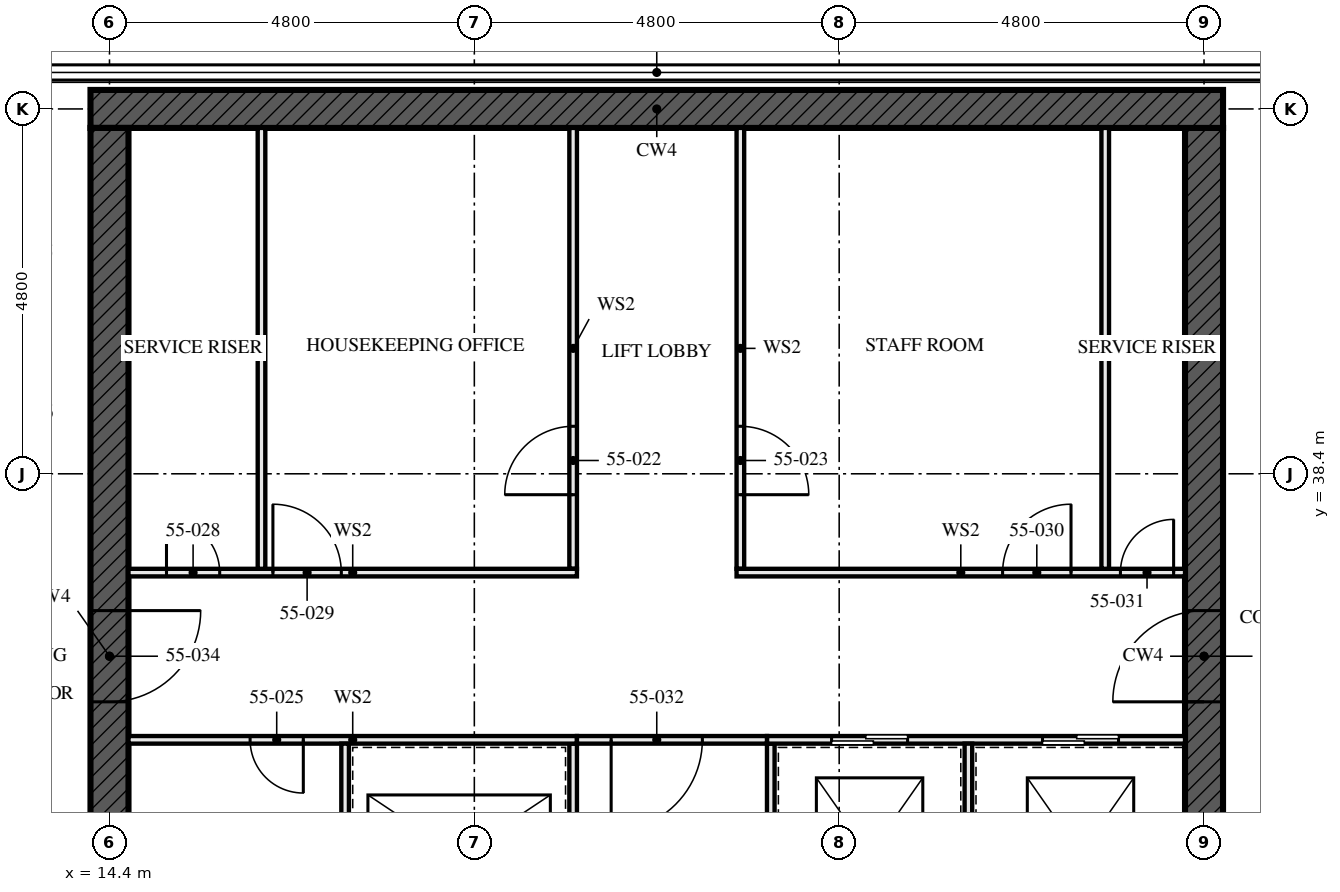
"""IFC4 building model, lengths in metres.
Left out: names, types, materials, properties, quantities, classifications, styles, units other than length and angle.
Written with IfcOpenShell. Run it as: python <this file> out.ifc"""

import sys

from ifc_helpers import new_model, si_unit, direction, frame, frame_2d, origin, place, context, subcontext, project, spatial, rectangle, extrude, element, fill, save


model = new_model("IFC4")
c1 = context("Model", 3, precision=1e-05, world=origin(), true_north=direction((0.0, 1.0)))
c2 = subcontext(c1, "Body", "Model", "MODEL_VIEW")
j1 = project(units=[si_unit("LENGTHUNIT", "METRE"), si_unit("PLANEANGLEUNIT", "RADIAN")], contexts=[c1])
p1 = place(None, origin())
s1 = spatial("IfcSite", under=j1, at=p1, CompositionType="ELEMENT")
p2 = place(p1, origin())
s2 = spatial("IfcBuilding", under=s1, at=p2, CompositionType="ELEMENT")
p3 = place(p2, frame((0.0, 0.0, 201.5)))
s3 = spatial("IfcBuildingStorey", under=s2, at=p3, CompositionType="ELEMENT", Elevation=201.5)
p4 = place(p3, frame((29.05, 43.2, -0.17), z_axis=(0.0, 0.0, 1.0), x_axis=(-1.0, 0.0, 0.0)))
e1 = element("IfcWall", 1, at=p4, inside=s3, PredefinedType="SHEAR", context=c2, shape_type="SweptSolid", body=[
    extrude(rectangle(XDim=14.9, YDim=0.5, at=frame_2d((7.45, 0.0))), origin(), (0.0, 0.0, 1.0), 3.5),
])
p5 = place(p3, frame((14.4, 42.95, -0.17), z_axis=(0.0, 0.0, 1.0), x_axis=(0.0, -1.0, 0.0)))
e2 = element("IfcWall", 2, at=p5, inside=s3, PredefinedType="SHEAR", context=c2, shape_type="SweptSolid", body=[
    extrude(rectangle(XDim=13.9, YDim=0.5, at=frame_2d((6.95, 0.0))), origin(), (0.0, 0.0, 1.0), 3.5),
])
p6 = place(p5, frame((6.35, 0.0, 0.17)))
e3 = element("IfcOpeningElement", 3, at=p6, cuts=e2, PredefinedType="OPENING", context=c2, shape_type="SweptSolid", body=[
    extrude(rectangle(XDim=1.2, YDim=2.1, at=frame_2d((0.6, 1.05))), frame((0.0, 0.26, 0.0), z_axis=(0.0, -1.0, 0.0), x_axis=(1.0, 0.0, 0.0)), (0.0, 0.0, 1.0), 0.521),
])
p7 = place(p3, frame((28.8, 29.05, -0.17), z_axis=(0.0, 0.0, 1.0), x_axis=(0.0, 1.0, 0.0)))
e4 = element("IfcWall", 4, at=p7, inside=s3, PredefinedType="SHEAR", context=c2, shape_type="SweptSolid", body=[
    extrude(rectangle(XDim=13.9, YDim=0.5, at=frame_2d((6.95, 0.0))), origin(), (0.0, 0.0, 1.0), 3.5),
])
p8 = place(p7, frame((6.35, 0.0, 0.17)))
e5 = element("IfcOpeningElement", 5, at=p8, cuts=e4, PredefinedType="OPENING", context=c2, shape_type="SweptSolid", body=[
    extrude(rectangle(XDim=1.2, YDim=2.1, at=frame_2d((0.6, 1.05))), frame((0.0, 0.26, 0.0), z_axis=(0.0, -1.0, 0.0), x_axis=(1.0, 0.0, 0.0)), (0.0, 0.0, 1.0), 0.521),
])
for number, where, z_axis, x_axis in (
    (6, (16.4, 37.15, 0.0), (0.0, 0.0, 1.0), (0.0, 1.0, 0.0)),
    (7, (27.5, 37.15, 0.0), (0.0, 0.0, 1.0), (0.0, 1.0, 0.0)),
):
    element("IfcWall", number, at=place(p3, frame(where, z_axis=z_axis, x_axis=x_axis)), inside=s3, PredefinedType="SOLIDWALL", context=c2, shape_type="SweptSolid", body=[
        extrude(rectangle(XDim=5.8, YDim=0.1, at=frame_2d((2.9, 0.0))), origin(), (0.0, 0.0, 1.0), 3.33),
    ])
p9 = place(p3, frame((20.5, 29.05, 0.0), z_axis=(0.0, 0.0, 1.0), x_axis=(0.0, 1.0, 0.0)))
e8 = element("IfcWall", 8, at=p9, inside=s3, PredefinedType="SOLIDWALL", context=c2, shape_type="SweptSolid", body=[
    extrude(rectangle(XDim=5.8, YDim=0.1, at=frame_2d((2.9, 0.0))), origin(), (0.0, 0.0, 1.0), 3.33),
])
p10 = place(p9, frame((0.8, 0.0, 0.0)))
e9 = element("IfcOpeningElement", 9, at=p10, cuts=e8, PredefinedType="OPENING", context=c2, shape_type="SweptSolid", body=[
    extrude(rectangle(XDim=1.1, YDim=2.3, at=frame_2d((0.55, 1.15))), frame((0.0, 0.061, 0.0), z_axis=(0.0, -1.0, 0.0), x_axis=(1.0, 0.0, 0.0)), (0.0, 0.0, 1.0), 0.121),
])
p11 = place(p9, frame((3.775, 0.0, 0.0)))
e10 = element("IfcOpeningElement", 10, at=p11, cuts=e8, PredefinedType="OPENING", context=c2, shape_type="SweptSolid", body=[
    extrude(rectangle(XDim=1.1, YDim=2.3, at=frame_2d((0.55, 1.15))), frame((0.0, 0.061, 0.0), z_axis=(0.0, -1.0, 0.0), x_axis=(1.0, 0.0, 0.0)), (0.0, 0.0, 1.0), 0.121),
])
p12 = place(p3, frame((20.5, 37.15, 0.0), z_axis=(0.0, 0.0, 1.0), x_axis=(0.0, 1.0, 0.0)))
e11 = element("IfcWall", 11, at=p12, inside=s3, PredefinedType="SOLIDWALL", context=c2, shape_type="SweptSolid", body=[
    extrude(rectangle(XDim=5.8, YDim=0.1, at=frame_2d((2.9, 0.0))), origin(), (0.0, 0.0, 1.0), 3.33),
])
p13 = place(p12, frame((0.975, 0.0, 0.0)))
e12 = element("IfcOpeningElement", 12, at=p13, cuts=e11, PredefinedType="OPENING", context=c2, shape_type="SweptSolid", body=[
    extrude(rectangle(XDim=0.9, YDim=2.1, at=frame_2d((0.45, 1.05))), frame((0.0, 0.061, 0.0), z_axis=(0.0, -1.0, 0.0), x_axis=(1.0, 0.0, 0.0)), (0.0, 0.0, 1.0), 0.121),
])
p14 = place(p3, frame((22.7, 37.15, 0.0), z_axis=(0.0, 0.0, 1.0), x_axis=(0.0, 1.0, 0.0)))
e13 = element("IfcWall", 13, at=p14, inside=s3, PredefinedType="SOLIDWALL", context=c2, shape_type="SweptSolid", body=[
    extrude(rectangle(XDim=5.8, YDim=0.1, at=frame_2d((2.9, 0.0))), origin(), (0.0, 0.0, 1.0), 3.33),
])
p15 = place(p14, frame((0.975, 0.0, 0.0)))
e14 = element("IfcOpeningElement", 14, at=p15, cuts=e13, PredefinedType="OPENING", context=c2, shape_type="SweptSolid", body=[
    extrude(rectangle(XDim=0.9, YDim=2.1, at=frame_2d((0.45, 1.05))), frame((0.0, 0.061, 0.0), z_axis=(0.0, -1.0, 0.0), x_axis=(1.0, 0.0, 0.0)), (0.0, 0.0, 1.0), 0.121),
])
p16 = place(p3, frame((23.1, 29.05, 0.0), z_axis=(0.0, 0.0, 1.0), x_axis=(0.0, 1.0, 0.0)))
e15 = element("IfcWall", 15, at=p16, inside=s3, PredefinedType="SOLIDWALL", context=c2, shape_type="SweptSolid", body=[
    extrude(rectangle(XDim=5.8, YDim=0.1, at=frame_2d((2.9, 0.0))), origin(), (0.0, 0.0, 1.0), 3.33),
])
p17 = place(p16, frame((1.0, 0.0, 0.0)))
e16 = element("IfcOpeningElement", 16, at=p17, cuts=e15, PredefinedType="OPENING", context=c2, shape_type="SweptSolid", body=[
    extrude(rectangle(XDim=0.7, YDim=2.1, at=frame_2d((0.35, 1.05))), frame((0.0, 0.061, 0.0), z_axis=(0.0, -1.0, 0.0), x_axis=(1.0, 0.0, 0.0)), (0.0, 0.0, 1.0), 0.121),
])
p18 = place(p3, frame((14.65, 34.9, 0.0), z_axis=(0.0, 0.0, 1.0), x_axis=(1.0, 0.0, 0.0)))
e17 = element("IfcWall", 17, at=p18, inside=s3, PredefinedType="SOLIDWALL", context=c2, shape_type="SweptSolid", body=[
    extrude(rectangle(XDim=5.9, YDim=0.1, at=frame_2d((2.95, 0.0))), origin(), (0.0, 0.0, 1.0), 3.33),
])
p19 = place(p18, frame((1.6, 0.0, 0.0)))
e18 = element("IfcOpeningElement", 18, at=p19, cuts=e17, PredefinedType="OPENING", context=c2, shape_type="SweptSolid", body=[
    extrude(rectangle(XDim=0.7, YDim=2.1, at=frame_2d((0.35, 1.05))), frame((0.0, 0.061, 0.0), z_axis=(0.0, -1.0, 0.0), x_axis=(1.0, 0.0, 0.0)), (0.0, 0.0, 1.0), 0.121),
])
p20 = place(p3, frame((23.05, 34.9, 0.0), z_axis=(0.0, 0.0, 1.0), x_axis=(1.0, 0.0, 0.0)))
e19 = element("IfcWall", 19, at=p20, inside=s3, PredefinedType="SOLIDWALL", context=c2, shape_type="SweptSolid", body=[
    extrude(rectangle(XDim=5.5, YDim=0.1, at=frame_2d((2.75, 0.0))), origin(), (0.0, 0.0, 1.0), 3.33),
])
p21 = place(p20, frame((0.85, 0.0, 0.0)))
e20 = element("IfcOpeningElement", 20, at=p21, cuts=e19, PredefinedType="OPENING", context=c2, shape_type="SweptSolid", body=[
    extrude(rectangle(XDim=1.0, YDim=2.1, at=frame_2d((0.5, 1.05))), frame((0.0, 0.061, 0.0), z_axis=(0.0, -1.0, 0.0), x_axis=(1.0, 0.0, 0.0)), (0.0, 0.0, 1.0), 0.121),
])
p22 = place(p20, frame((3.625, 0.0, 0.0)))
e21 = element("IfcOpeningElement", 21, at=p22, cuts=e19, PredefinedType="OPENING", context=c2, shape_type="SweptSolid", body=[
    extrude(rectangle(XDim=1.0, YDim=2.1, at=frame_2d((0.5, 1.05))), frame((0.0, 0.061, 0.0), z_axis=(0.0, -1.0, 0.0), x_axis=(1.0, 0.0, 0.0)), (0.0, 0.0, 1.0), 0.121),
])
p23 = place(p3, frame((14.65, 37.1, 0.0), z_axis=(0.0, 0.0, 1.0), x_axis=(1.0, 0.0, 0.0)))
e22 = element("IfcWall", 22, at=p23, inside=s3, PredefinedType="SOLIDWALL", context=c2, shape_type="SweptSolid", body=[
    extrude(rectangle(XDim=5.9, YDim=0.1, at=frame_2d((2.95, 0.0))), origin(), (0.0, 0.0, 1.0), 3.33),
])
p24 = place(p23, frame((0.5, 0.0, 0.0)))
e23 = element("IfcOpeningElement", 23, at=p24, cuts=e22, PredefinedType="OPENING", context=c2, shape_type="SweptSolid", body=[
    extrude(rectangle(XDim=0.7, YDim=2.1, at=frame_2d((0.35, 1.05))), frame((0.0, 0.061, 0.0), z_axis=(0.0, -1.0, 0.0), x_axis=(1.0, 0.0, 0.0)), (0.0, 0.0, 1.0), 0.121),
])
p25 = place(p23, frame((1.9, 0.0, 0.0)))
e24 = element("IfcOpeningElement", 24, at=p25, cuts=e22, PredefinedType="OPENING", context=c2, shape_type="SweptSolid", body=[
    extrude(rectangle(XDim=0.9, YDim=2.1, at=frame_2d((0.45, 1.05))), frame((0.0, 0.061, 0.0), z_axis=(0.0, -1.0, 0.0), x_axis=(1.0, 0.0, 0.0)), (0.0, 0.0, 1.0), 0.121),
])
p26 = place(p3, frame((22.65, 37.1, 0.0), z_axis=(0.0, 0.0, 1.0), x_axis=(1.0, 0.0, 0.0)))
e25 = element("IfcWall", 25, at=p26, inside=s3, PredefinedType="SOLIDWALL", context=c2, shape_type="SweptSolid", body=[
    extrude(rectangle(XDim=5.9, YDim=0.1, at=frame_2d((2.95, 0.0))), origin(), (0.0, 0.0, 1.0), 3.33),
])
p27 = place(p26, frame((3.5, 0.0, 0.0)))
e26 = element("IfcOpeningElement", 26, at=p27, cuts=e25, PredefinedType="OPENING", context=c2, shape_type="SweptSolid", body=[
    extrude(rectangle(XDim=0.9, YDim=2.1, at=frame_2d((0.45, 1.05))), frame((0.0, 0.061, 0.0), z_axis=(0.0, -1.0, 0.0), x_axis=(1.0, 0.0, 0.0)), (0.0, 0.0, 1.0), 0.121),
])
p28 = place(p26, frame((5.05, 0.0, 0.0)))
e27 = element("IfcOpeningElement", 27, at=p28, cuts=e25, PredefinedType="OPENING", context=c2, shape_type="SweptSolid", body=[
    extrude(rectangle(XDim=0.7, YDim=2.1, at=frame_2d((0.35, 1.05))), frame((0.0, 0.061, 0.0), z_axis=(0.0, -1.0, 0.0), x_axis=(1.0, 0.0, 0.0)), (0.0, 0.0, 1.0), 0.121),
])
p29 = place(p3, frame((20.55, 34.9, 0.0), z_axis=(0.0, 0.0, 1.0), x_axis=(1.0, 0.0, 0.0)))
e28 = element("IfcWall", 28, at=p29, inside=s3, PredefinedType="SOLIDWALL", context=c2, shape_type="SweptSolid", body=[
    extrude(rectangle(XDim=2.5, YDim=0.1, at=frame_2d((1.25, 0.0))), origin(), (0.0, 0.0, 1.0), 3.33),
])
p30 = place(p29, frame((0.45, 0.0, 0.0)))
e29 = element("IfcOpeningElement", 29, at=p30, cuts=e28, PredefinedType="OPENING", context=c2, shape_type="SweptSolid", body=[
    extrude(rectangle(XDim=1.2, YDim=2.1, at=frame_2d((0.6, 1.05))), frame((0.0, 0.061, 0.0), z_axis=(0.0, -1.0, 0.0), x_axis=(1.0, 0.0, 0.0)), (0.0, 0.0, 1.0), 0.121),
])
p31 = place(p3, frame((17.5, 29.05, 0.0), z_axis=(0.0, 0.0, 1.0), x_axis=(0.0, 1.0, 0.0)))
e30 = element("IfcWall", 30, at=p31, inside=s3, PredefinedType="SOLIDWALL", context=c2, shape_type="SweptSolid", body=[
    extrude(rectangle(XDim=5.8, YDim=0.1, at=frame_2d((2.9, 0.0))), origin(), (0.0, 0.0, 1.0), 3.33),
])
p32 = place(p3, frame((25.7, 31.95, 0.0), z_axis=(0.0, 0.0, 1.0), x_axis=(0.0, 1.0, 0.0)))
e31 = element("IfcWall", 31, at=p32, inside=s3, PredefinedType="SOLIDWALL", context=c2, shape_type="SweptSolid", body=[
    extrude(rectangle(XDim=2.9, YDim=0.1, at=frame_2d((1.45, 0.0))), origin(), (0.0, 0.0, 1.0), 3.33),
])
p33 = place(p13, origin())
e32 = element("IfcDoor", 32, at=p33, inside=s3, OperationType="SINGLE_SWING_RIGHT", PredefinedType="DOOR", context=c2, shape_type="SweptSolid", body=[
    extrude(rectangle(XDim=0.9, YDim=2.1, at=frame_2d((0.45, 1.05))), frame((0.0, 0.027, 0.0), z_axis=(0.0, -1.0, 0.0), x_axis=(1.0, 0.0, 0.0)), (0.0, 0.0, 1.0), 0.054),
])
fill(e12, e32)
p34 = place(p15, frame((0.9, 0.0, 0.0), z_axis=(0.0, 0.0, 1.0), x_axis=(-1.0, 0.0, 0.0)))
e33 = element("IfcDoor", 33, at=p34, inside=s3, OperationType="SINGLE_SWING_LEFT", PredefinedType="DOOR", context=c2, shape_type="SweptSolid", body=[
    extrude(rectangle(XDim=0.9, YDim=2.1, at=frame_2d((0.45, 1.05))), frame((0.0, 0.027, 0.0), z_axis=(0.0, -1.0, 0.0), x_axis=(1.0, 0.0, 0.0)), (0.0, 0.0, 1.0), 0.054),
])
fill(e14, e33)
p35 = place(p19, frame((0.7, 0.0, 0.0), z_axis=(0.0, 0.0, 1.0), x_axis=(-1.0, 0.0, 0.0)))
e34 = element("IfcDoor", 34, at=p35, inside=s3, OperationType="SINGLE_SWING_RIGHT", PredefinedType="DOOR", context=c2, shape_type="SweptSolid", body=[
    extrude(rectangle(XDim=0.7, YDim=2.1, at=frame_2d((0.35, 1.05))), frame((0.0, 0.027, 0.0), z_axis=(0.0, -1.0, 0.0), x_axis=(1.0, 0.0, 0.0)), (0.0, 0.0, 1.0), 0.054),
])
fill(e18, e34)
p36 = place(p21, origin())
e35 = element("IfcDoor", 35, at=p36, inside=s3, OperationType="SLIDING_TO_LEFT", PredefinedType="DOOR", context=c2, shape_type="SweptSolid", body=[
    extrude(rectangle(XDim=1.0, YDim=2.1, at=frame_2d((0.5, 1.05))), frame((0.0, 0.05, 0.0), z_axis=(0.0, -1.0, 0.0), x_axis=(1.0, 0.0, 0.0)), (0.0, 0.0, 1.0), 0.1),
])
fill(e20, e35)
p37 = place(p22, origin())
e36 = element("IfcDoor", 36, at=p37, inside=s3, OperationType="SLIDING_TO_LEFT", PredefinedType="DOOR", context=c2, shape_type="SweptSolid", body=[
    extrude(rectangle(XDim=1.0, YDim=2.1, at=frame_2d((0.5, 1.05))), frame((0.0, 0.05, 0.0), z_axis=(0.0, -1.0, 0.0), x_axis=(1.0, 0.0, 0.0)), (0.0, 0.0, 1.0), 0.1),
])
fill(e21, e36)
p38 = place(p24, origin())
e37 = element("IfcDoor", 37, at=p38, inside=s3, OperationType="SINGLE_SWING_RIGHT", PredefinedType="DOOR", context=c2, shape_type="SweptSolid", body=[
    extrude(rectangle(XDim=0.7, YDim=2.1, at=frame_2d((0.35, 1.05))), frame((0.0, 0.027, 0.0), z_axis=(0.0, -1.0, 0.0), x_axis=(1.0, 0.0, 0.0)), (0.0, 0.0, 1.0), 0.054),
])
fill(e23, e37)
p39 = place(p25, origin())
e38 = element("IfcDoor", 38, at=p39, inside=s3, OperationType="SINGLE_SWING_RIGHT", PredefinedType="DOOR", context=c2, shape_type="SweptSolid", body=[
    extrude(rectangle(XDim=0.9, YDim=2.1, at=frame_2d((0.45, 1.05))), frame((0.0, 0.027, 0.0), z_axis=(0.0, -1.0, 0.0), x_axis=(1.0, 0.0, 0.0)), (0.0, 0.0, 1.0), 0.054),
])
fill(e24, e38)
p40 = place(p27, origin())
e39 = element("IfcDoor", 39, at=p40, inside=s3, OperationType="SINGLE_SWING_LEFT", PredefinedType="DOOR", context=c2, shape_type="SweptSolid", body=[
    extrude(rectangle(XDim=0.9, YDim=2.1, at=frame_2d((0.45, 1.05))), frame((0.0, 0.027, 0.0), z_axis=(0.0, -1.0, 0.0), x_axis=(1.0, 0.0, 0.0)), (0.0, 0.0, 1.0), 0.054),
])
fill(e26, e39)
p41 = place(p28, origin())
e40 = element("IfcDoor", 40, at=p41, inside=s3, OperationType="SINGLE_SWING_LEFT", PredefinedType="DOOR", context=c2, shape_type="SweptSolid", body=[
    extrude(rectangle(XDim=0.7, YDim=2.1, at=frame_2d((0.35, 1.05))), frame((0.0, 0.027, 0.0), z_axis=(0.0, -1.0, 0.0), x_axis=(1.0, 0.0, 0.0)), (0.0, 0.0, 1.0), 0.054),
])
fill(e27, e40)
p42 = place(p30, frame((1.2, 0.0, 0.0), z_axis=(0.0, 0.0, 1.0), x_axis=(-1.0, 0.0, 0.0)))
e41 = element("IfcDoor", 41, at=p42, inside=s3, OperationType="SINGLE_SWING_LEFT", PredefinedType="DOOR", context=c2, shape_type="SweptSolid", body=[
    extrude(rectangle(XDim=1.2, YDim=2.1, at=frame_2d((0.6, 1.05))), frame((0.0, 0.027, 0.0), z_axis=(0.0, -1.0, 0.0), x_axis=(1.0, 0.0, 0.0)), (0.0, 0.0, 1.0), 0.054),
])
fill(e29, e41)
p43 = place(p6, origin())
e42 = element("IfcDoor", 42, at=p43, inside=s3, OperationType="SINGLE_SWING_LEFT", PredefinedType="DOOR", context=c2, shape_type="SweptSolid", body=[
    extrude(rectangle(XDim=1.2, YDim=2.1, at=frame_2d((0.6, 1.05))), frame((0.0, 0.027, 0.0), z_axis=(0.0, -1.0, 0.0), x_axis=(1.0, 0.0, 0.0)), (0.0, 0.0, 1.0), 0.054),
])
fill(e3, e42)
p44 = place(p8, origin())
e43 = element("IfcDoor", 43, at=p44, inside=s3, OperationType="SINGLE_SWING_LEFT", PredefinedType="DOOR", context=c2, shape_type="SweptSolid", body=[
    extrude(rectangle(XDim=1.2, YDim=2.1, at=frame_2d((0.6, 1.05))), frame((0.0, 0.027, 0.0), z_axis=(0.0, -1.0, 0.0), x_axis=(1.0, 0.0, 0.0)), (0.0, 0.0, 1.0), 0.054),
])
fill(e5, e43)
save(model, sys.argv[1])
